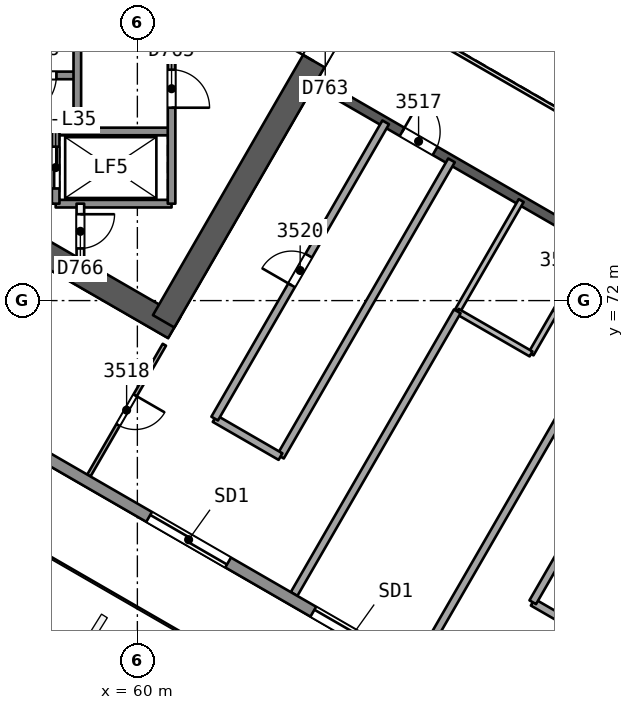
"""IFC4 building model, lengths in metres.
Left out: names, types, materials, properties, quantities, classifications, styles, units other than length and angle.
Written with IfcOpenShell. Run it as: python <this file> out.ifc"""

import sys

from ifc_helpers import new_model, si_unit, direction, frame, frame_2d, origin, place, context, subcontext, project, spatial, rectangle, extrude, element, fill, save


model = new_model("IFC4")
c1 = context("Model", 3, precision=1e-05, world=origin(), true_north=direction((0.0, 1.0)))
c2 = subcontext(c1, "Body", "Model", "MODEL_VIEW")
j1 = project(units=[si_unit("LENGTHUNIT", "METRE"), si_unit("PLANEANGLEUNIT", "RADIAN")], contexts=[c1])
p1 = place(None, origin())
s1 = spatial("IfcSite", under=j1, at=p1, CompositionType="ELEMENT")
p2 = place(p1, origin())
s2 = spatial("IfcBuilding", under=s1, at=p2, CompositionType="ELEMENT")
p3 = place(p2, frame((0.0, 0.0, 143.8)))
s3 = spatial("IfcBuildingStorey", under=s2, at=p3, CompositionType="ELEMENT", Elevation=143.8)
p4 = place(p3, frame((48.722, 78.365, 0.0), z_axis=(0.0, 0.0, 1.0), x_axis=(0.866020036431, -0.500009296414, 0.0)))
e1 = element("IfcWall", 1, at=p4, inside=s3, PredefinedType="SHEAR", context=c2, shape_type="SweptSolid", body=[
    extrude(rectangle(XDim=14.146, YDim=0.65, at=frame_2d((7.073, 0.0))), origin(), (0.0, 0.0, 1.0), 3.7),
])
p5 = place(p3, frame((60.691, 71.455, 0.0), z_axis=(0.0, 0.0, 1.0), x_axis=(0.499983075189, 0.866035175108, 0.0)))
e2 = element("IfcWall", 2, at=p5, inside=s3, PredefinedType="SHEAR", context=c2, shape_type="SweptSolid", body=[
    extrude(rectangle(XDim=10.055, YDim=0.65, at=frame_2d((5.027, 0.0))), origin(), (0.0, 0.0, 1.0), 3.7),
])
p6 = place(p5, frame((7.905, 0.0, 0.0)))
e3 = element("IfcOpeningElement", 3, at=p6, cuts=e2, PredefinedType="OPENING", context=c2, shape_type="SweptSolid", body=[
    extrude(rectangle(XDim=1.2, YDim=2.1, at=frame_2d((0.6, 1.05))), frame((0.0, 0.335, 0.0), z_axis=(0.0, -1.0, 0.0), x_axis=(1.0, 0.0, 0.0)), (0.0, 0.0, 1.0), 0.671),
])
p7 = place(p3, frame((64.7, 77.748, 0.0), z_axis=(0.0, 0.0, 1.0), x_axis=(0.866026492143, -0.499998114903, 0.0)))
e4 = element("IfcWall", 4, at=p7, inside=s3, PredefinedType="SHEAR", context=c2, shape_type="SweptSolid", body=[
    extrude(rectangle(XDim=15.588, YDim=0.25, at=frame_2d((7.794, 0.0))), origin(), (0.0, 0.0, 1.0), 3.25),
])
p8 = place(p7, frame((2.618, 0.0, 0.0)))
e5 = element("IfcOpeningElement", 5, at=p8, cuts=e4, PredefinedType="OPENING", context=c2, shape_type="SweptSolid", body=[
    extrude(rectangle(XDim=1.0, YDim=2.1, at=frame_2d((0.5, 1.05))), frame((0.0, 0.135, 0.0), z_axis=(0.0, -1.0, 0.0), x_axis=(1.0, 0.0, 0.0)), (0.0, 0.0, 1.0), 0.271),
])
p9 = place(p7, frame((8.727, 0.0, 0.0)))
e6 = element("IfcOpeningElement", 6, at=p9, cuts=e4, PredefinedType="OPENING", context=c2, shape_type="SweptSolid", body=[
    extrude(rectangle(XDim=1.0, YDim=2.1, at=frame_2d((0.5, 1.05))), frame((0.0, 0.135, 0.0), z_axis=(0.0, -1.0, 0.0), x_axis=(1.0, 0.0, 0.0)), (0.0, 0.0, 1.0), 0.271),
])
p10 = place(p7, frame((12.282, 0.0, 0.0)))
e7 = element("IfcOpeningElement", 7, at=p10, cuts=e4, PredefinedType="OPENING", context=c2, shape_type="SweptSolid", body=[
    extrude(rectangle(XDim=1.0, YDim=2.1, at=frame_2d((0.5, 1.05))), frame((0.0, 0.135, 0.0), z_axis=(0.0, -1.0, 0.0), x_axis=(1.0, 0.0, 0.0)), (0.0, 0.0, 1.0), 0.271),
])
p11 = place(p3, frame((60.71, 70.838, 0.0), z_axis=(0.0, 0.0, 1.0), x_axis=(-0.499997169302, -0.866027038082, 0.0)))
e8 = element("IfcWall", 8, at=p11, inside=s3, PredefinedType="PARTITIONING", context=c2, shape_type="SweptSolid", body=[
    extrude(rectangle(XDim=3.975, YDim=0.1, at=frame_2d((1.987, 0.0))), origin(), (0.0, 0.0, 1.0), 3.25),
])
p12 = place(p11, frame((1.537, 0.0, 0.0)))
e9 = element("IfcOpeningElement", 9, at=p12, cuts=e8, PredefinedType="OPENING", context=c2, shape_type="SweptSolid", body=[
    extrude(rectangle(XDim=0.9, YDim=2.1, at=frame_2d((0.45, 1.05))), frame((0.0, 0.061, 0.0), z_axis=(0.0, -1.0, 0.0), x_axis=(1.0, 0.0, 0.0)), (0.0, 0.0, 1.0), 0.121),
])
p13 = place(p3, frame((68.266, 75.689, 0.0), z_axis=(0.0, 0.0, 1.0), x_axis=(-0.5000018851, -0.866024315419, 0.0)))
e10 = element("IfcWall", 10, at=p13, inside=s3, PredefinedType="PARTITIONING", context=c2, shape_type="SweptSolid", body=[
    extrude(rectangle(XDim=9.0, YDim=0.2, at=frame_2d((4.5, 0.0))), origin(), (0.0, 0.0, 1.0), 3.25),
])
p14 = place(p3, frame((63.766, 67.895, 0.0), z_axis=(0.0, 0.0, 1.0), x_axis=(-0.866041268327, 0.499972520799, 0.0)))
e11 = element("IfcWall", 11, at=p14, inside=s3, PredefinedType="PARTITIONING", context=c2, shape_type="SweptSolid", body=[
    extrude(rectangle(XDim=2.0, YDim=0.2, at=frame_2d((1.0, 0.0))), origin(), (0.0, 0.0, 1.0), 3.25),
])
p15 = place(p3, frame((62.034, 68.895, 0.0), z_axis=(0.0, 0.0, 1.0), x_axis=(0.5000018851, 0.866024315419, 0.0)))
e12 = element("IfcWall", 12, at=p15, inside=s3, PredefinedType="PARTITIONING", context=c2, shape_type="SweptSolid", body=[
    extrude(rectangle(XDim=9.0, YDim=0.2, at=frame_2d((4.5, 0.0))), origin(), (0.0, 0.0, 1.0), 3.25),
])
p16 = place(p15, frame((4.05, 0.0, 0.0)))
e13 = element("IfcOpeningElement", 13, at=p16, cuts=e12, PredefinedType="OPENING", context=c2, shape_type="SweptSolid", body=[
    extrude(rectangle(XDim=0.9, YDim=2.1, at=frame_2d((0.45, 1.05))), frame((0.0, 0.11, 0.0), z_axis=(0.0, -1.0, 0.0), x_axis=(1.0, 0.0, 0.0)), (0.0, 0.0, 1.0), 0.221),
])
p17 = place(p3, frame((64.123, 64.279, 0.0), z_axis=(0.0, 0.0, 1.0), x_axis=(0.500006224803, 0.866021809863, 0.0)))
e14 = element("IfcWall", 14, at=p17, inside=s3, PredefinedType="PARTITIONING", context=c2, shape_type="SweptSolid", body=[
    extrude(rectangle(XDim=8.589, YDim=0.2, at=frame_2d((4.295, 0.0))), origin(), (0.0, 0.0, 1.0), 3.25),
])
p18 = place(p3, frame((68.418, 71.717, 0.0), z_axis=(0.0, 0.0, 1.0), x_axis=(0.499994660107, 0.866028486751, 0.0)))
e15 = element("IfcWall", 15, at=p18, inside=s3, PredefinedType="PARTITIONING", context=c2, shape_type="SweptSolid", body=[
    extrude(rectangle(XDim=3.364, YDim=0.15, at=frame_2d((1.682, 0.0))), origin(), (0.0, 0.0, 1.0), 3.25),
])
p19 = place(p3, frame((72.041, 73.51, 0.0), z_axis=(0.0, 0.0, 1.0), x_axis=(-0.499994660107, -0.866028486751, 0.0)))
e16 = element("IfcWall", 16, at=p19, inside=s3, PredefinedType="PARTITIONING", context=c2, shape_type="SweptSolid", body=[
    extrude(rectangle(XDim=3.364, YDim=0.15, at=frame_2d((1.682, 0.0))), origin(), (0.0, 0.0, 1.0), 3.25),
])
p20 = place(p19, frame((1.282, 0.0, 0.0)))
e17 = element("IfcOpeningElement", 17, at=p20, cuts=e16, PredefinedType="OPENING", context=c2, shape_type="SweptSolid", body=[
    extrude(rectangle(XDim=0.8, YDim=2.1, at=frame_2d((0.4, 1.05))), frame((0.0, 0.085, 0.0), z_axis=(0.0, -1.0, 0.0), x_axis=(1.0, 0.0, 0.0)), (0.0, 0.0, 1.0), 0.171),
])
p21 = place(p3, frame((70.359, 70.596, 0.0), z_axis=(0.0, 0.0, 1.0), x_axis=(-0.866022320763, 0.500005339912, 0.0)))
e18 = element("IfcWall", 18, at=p21, inside=s3, PredefinedType="PARTITIONING", context=c2, shape_type="SweptSolid", body=[
    extrude(rectangle(XDim=2.241, YDim=0.15, at=frame_2d((1.121, 0.0))), origin(), (0.0, 0.0, 1.0), 3.25),
])
p22 = place(p3, frame((67.363, 62.408, 0.0), z_axis=(0.0, 0.0, 1.0), x_axis=(0.500002969958, 0.866023689072, 0.0)))
e19 = element("IfcWall", 19, at=p22, inside=s3, PredefinedType="PARTITIONING", context=c2, shape_type="SweptSolid", body=[
    extrude(rectangle(XDim=11.954, YDim=0.2, at=frame_2d((5.977, 0.0))), origin(), (0.0, 0.0, 1.0), 3.25),
])
p23 = place(p3, frame((72.136, 63.063, 0.0), z_axis=(0.0, 0.0, 1.0), x_axis=(-0.866010750942, 0.50002537861, 0.0)))
e20 = element("IfcWall", 20, at=p23, inside=s3, PredefinedType="PARTITIONING", context=c2, shape_type="SweptSolid", body=[
    extrude(rectangle(XDim=2.0, YDim=0.2, at=frame_2d((1.0, 0.0))), origin(), (0.0, 0.0, 1.0), 3.25),
])
p24 = place(p3, frame((70.404, 64.063, 0.0), z_axis=(0.0, 0.0, 1.0), x_axis=(0.499990139034, 0.866031096941, 0.0)))
e21 = element("IfcWall", 21, at=p24, inside=s3, PredefinedType="PARTITIONING", context=c2, shape_type="SweptSolid", body=[
    extrude(rectangle(XDim=9.0, YDim=0.2, at=frame_2d((4.5, 0.0))), origin(), (0.0, 0.0, 1.0), 3.25),
])
p25 = place(p24, frame((4.05, 0.0, 0.0)))
e22 = element("IfcOpeningElement", 22, at=p25, cuts=e21, PredefinedType="OPENING", context=c2, shape_type="SweptSolid", body=[
    extrude(rectangle(XDim=0.9, YDim=2.1, at=frame_2d((0.45, 1.05))), frame((0.0, 0.11, 0.0), z_axis=(0.0, -1.0, 0.0), x_axis=(1.0, 0.0, 0.0)), (0.0, 0.0, 1.0), 0.221),
])
p26 = place(p3, frame((89.31, 49.565, 0.0), z_axis=(0.0, 0.0, 1.0), x_axis=(-0.866024712045, 0.500001198125, 0.0)))
e23 = element("IfcWall", 23, at=p26, inside=s3, PredefinedType="SOLIDWALL", context=c2, shape_type="SweptSolid", body=[
    extrude(rectangle(XDim=55.219, YDim=0.3, at=frame_2d((27.61, 0.0))), origin(), (0.0, 0.0, 1.0), 3.25),
])
p27 = place(p26, frame((31.086, 0.0, 0.0)))
e24 = element("IfcOpeningElement", 24, at=p27, cuts=e23, PredefinedType="OPENING", context=c2, shape_type="SweptSolid", body=[
    extrude(rectangle(XDim=2.4, YDim=2.4, at=frame_2d((1.2, 1.2))), frame((0.0, 0.161, 0.0), z_axis=(0.0, -1.0, 0.0), x_axis=(1.0, 0.0, 0.0)), (0.0, 0.0, 1.0), 0.321),
])
p28 = place(p26, frame((42.892, 0.0, 0.0)))
e25 = element("IfcOpeningElement", 25, at=p28, cuts=e23, PredefinedType="OPENING", context=c2, shape_type="SweptSolid", body=[
    extrude(rectangle(XDim=2.4, YDim=2.4, at=frame_2d((1.2, 1.2))), frame((0.0, 0.161, 0.0), z_axis=(0.0, -1.0, 0.0), x_axis=(1.0, 0.0, 0.0)), (0.0, 0.0, 1.0), 0.321),
])
p29 = place(p26, frame((21.421, 0.0, 0.0)))
e26 = element("IfcOpeningElement", 26, at=p29, cuts=e23, PredefinedType="OPENING", context=c2, shape_type="SweptSolid", body=[
    extrude(rectangle(XDim=2.4, YDim=2.4, at=frame_2d((1.2, 1.2))), frame((0.0, 0.161, 0.0), z_axis=(0.0, -1.0, 0.0), x_axis=(1.0, 0.0, 0.0)), (0.0, 0.0, 1.0), 0.321),
])
p30 = place(p26, frame((9.906, 0.0, 0.0)))
e27 = element("IfcOpeningElement", 27, at=p30, cuts=e23, PredefinedType="OPENING", context=c2, shape_type="SweptSolid", body=[
    extrude(rectangle(XDim=2.4, YDim=2.4, at=frame_2d((1.2, 1.2))), frame((0.0, 0.161, 0.0), z_axis=(0.0, -1.0, 0.0), x_axis=(1.0, 0.0, 0.0)), (0.0, 0.0, 1.0), 0.321),
])
p31 = place(p26, frame((26.098, 0.0, 0.0)))
e28 = element("IfcOpeningElement", 28, at=p31, cuts=e23, PredefinedType="OPENING", context=c2, shape_type="SweptSolid", body=[
    extrude(rectangle(XDim=2.4, YDim=2.4, at=frame_2d((1.2, 1.2))), frame((0.0, 0.161, 0.0), z_axis=(0.0, -1.0, 0.0), x_axis=(1.0, 0.0, 0.0)), (0.0, 0.0, 1.0), 0.321),
])
p32 = place(p3, frame((58.42, 77.925, 0.0), z_axis=(0.0, 0.0, 1.0), x_axis=(-1.0, 0.0, 0.0)))
e29 = element("IfcWall", 29, at=p32, inside=s3, PredefinedType="SOLIDWALL", context=c2, shape_type="SweptSolid", body=[
    extrude(rectangle(XDim=7.7, YDim=0.2, at=frame_2d((3.85, 0.0))), origin(), (0.0, 0.0, 1.0), 3.25),
])
p33 = place(p32, frame((0.55, 0.0, 0.0)))
e30 = element("IfcOpeningElement", 30, at=p33, cuts=e29, PredefinedType="OPENING", context=c2, shape_type="SweptSolid", body=[
    extrude(rectangle(XDim=1.1, YDim=2.1, at=frame_2d((0.55, 1.05))), frame((0.0, 0.11, 0.0), z_axis=(0.0, -1.0, 0.0), x_axis=(1.0, 0.0, 0.0)), (0.0, 0.0, 1.0), 0.221),
])
for number, where, z_axis, x_axis in (
    (31, (60.9, 76.45, 0.0), (0.0, 0.0, 1.0), (-1.0, 0.0, 0.0)),
    (32, (60.9, 74.55, 0.0), (0.0, 0.0, 1.0), (-1.0, 0.0, 0.0)),
):
    element("IfcWall", number, at=place(p3, frame(where, z_axis=z_axis, x_axis=x_axis)), inside=s3, PredefinedType="SOLIDWALL", context=c2, shape_type="SweptSolid", body=[
        extrude(rectangle(XDim=3.05, YDim=0.2, at=frame_2d((1.525, 0.0))), origin(), (0.0, 0.0, 1.0), 3.25),
    ])
p34 = place(p3, frame((60.9, 85.45, 0.0), z_axis=(0.0, 0.0, 1.0), x_axis=(0.0, -1.0, 0.0)))
e33 = element("IfcWall", 33, at=p34, inside=s3, PredefinedType="SOLIDWALL", context=c2, shape_type="SweptSolid", body=[
    extrude(rectangle(XDim=10.9, YDim=0.2, at=frame_2d((5.45, 0.0))), origin(), (0.0, 0.0, 1.0), 3.25),
])
p35 = place(p34, frame((2.875, 0.0, 0.0)))
e34 = element("IfcOpeningElement", 34, at=p35, cuts=e33, PredefinedType="OPENING", context=c2, shape_type="SweptSolid", body=[
    extrude(rectangle(XDim=1.0, YDim=2.1, at=frame_2d((0.5, 1.05))), frame((0.0, 0.11, 0.0), z_axis=(0.0, -1.0, 0.0), x_axis=(1.0, 0.0, 0.0)), (0.0, 0.0, 1.0), 0.221),
])
p36 = place(p34, frame((7.375, 0.0, 0.0)))
e35 = element("IfcOpeningElement", 35, at=p36, cuts=e33, PredefinedType="OPENING", context=c2, shape_type="SweptSolid", body=[
    extrude(rectangle(XDim=1.0, YDim=2.1, at=frame_2d((0.5, 1.05))), frame((0.0, 0.11, 0.0), z_axis=(0.0, -1.0, 0.0), x_axis=(1.0, 0.0, 0.0)), (0.0, 0.0, 1.0), 0.221),
])
p37 = place(p3, frame((58.5, 74.55, 0.0), z_axis=(0.0, 0.0, 1.0), x_axis=(0.0, -1.0, 0.0)))
e36 = element("IfcWall", 36, at=p37, inside=s3, PredefinedType="PARTITIONING", context=c2, shape_type="SweptSolid", body=[
    extrude(rectangle(XDim=1.455, YDim=0.2, at=frame_2d((0.728, 0.0))), origin(), (0.0, 0.0, 1.0), 3.25),
])
p38 = place(p37, frame((0.278, 0.0, 0.0)))
e37 = element("IfcOpeningElement", 37, at=p38, cuts=e36, PredefinedType="OPENING", context=c2, shape_type="SweptSolid", body=[
    extrude(rectangle(XDim=0.9, YDim=2.1, at=frame_2d((0.45, 1.05))), frame((0.0, 0.11, 0.0), z_axis=(0.0, -1.0, 0.0), x_axis=(1.0, 0.0, 0.0)), (0.0, 0.0, 1.0), 0.221),
])
p39 = place(p3, frame((58.42, 85.45, 0.0), z_axis=(0.0, 0.0, 1.0), x_axis=(0.0, -1.0, 0.0)))
e38 = element("IfcWall", 38, at=p39, inside=s3, PredefinedType="SOLIDWALL", context=c2, shape_type="SweptSolid", body=[
    extrude(rectangle(XDim=9.0, YDim=0.2, at=frame_2d((4.5, 0.0))), origin(), (0.0, 0.0, 1.0), 3.25),
])
p40 = place(p3, frame((57.85, 76.45, 0.0), z_axis=(0.0, 0.0, 1.0), x_axis=(0.0, -1.0, 0.0)))
e39 = element("IfcWall", 39, at=p40, inside=s3, PredefinedType="SOLIDWALL", context=c2, shape_type="SweptSolid", body=[
    extrude(rectangle(XDim=1.9, YDim=0.2, at=frame_2d((0.95, 0.0))), origin(), (0.0, 0.0, 1.0), 3.25),
])
p41 = place(p40, frame((0.4, 0.0, 0.0)))
e40 = element("IfcOpeningElement", 40, at=p41, cuts=e39, PredefinedType="OPENING", context=c2, shape_type="SweptSolid", body=[
    extrude(rectangle(XDim=1.1, YDim=2.1, at=frame_2d((0.55, 1.05))), frame((0.0, 0.11, 0.0), z_axis=(0.0, -1.0, 0.0), x_axis=(1.0, 0.0, 0.0)), (0.0, 0.0, 1.0), 0.221),
])
p42 = place(p3, frame((67.702, 78.948, 0.0), z_axis=(0.0, 0.0, 1.0), x_axis=(0.866026658274, -0.499997827154, 0.0)))
e41 = element("IfcWall", 41, at=p42, inside=s3, PredefinedType="PARTITIONING", context=c2, shape_type="SweptSolid", body=[
    extrude(rectangle(XDim=11.588, YDim=0.1, at=frame_2d((5.794, 0.0))), origin(), (0.0, 0.0, 1.0), 3.25),
])
p43 = place(p8, origin())
e42 = element("IfcDoor", 42, at=p43, inside=s3, OperationType="SINGLE_SWING_LEFT", PredefinedType="NOTDEFINED", context=c2, shape_type="SweptSolid", body=[
    extrude(rectangle(XDim=1.0, YDim=2.1, at=frame_2d((0.5, 1.05))), frame((0.0, 0.025, 0.0), z_axis=(0.0, -1.0, 0.0), x_axis=(1.0, 0.0, 0.0)), (0.0, 0.0, 1.0), 0.05),
])
fill(e5, e42)
p44 = place(p12, origin())
e43 = element("IfcDoor", 43, at=p44, inside=s3, OperationType="SINGLE_SWING_LEFT", PredefinedType="NOTDEFINED", context=c2, shape_type="SweptSolid", body=[
    extrude(rectangle(XDim=0.9, YDim=2.1, at=frame_2d((0.45, 1.05))), frame((0.0, 0.025, 0.0), z_axis=(0.0, -1.0, 0.0), x_axis=(1.0, 0.0, 0.0)), (0.0, 0.0, 1.0), 0.05),
])
fill(e9, e43)
p45 = place(p16, origin())
e44 = element("IfcDoor", 44, at=p45, inside=s3, OperationType="SINGLE_SWING_LEFT", PredefinedType="NOTDEFINED", context=c2, shape_type="SweptSolid", body=[
    extrude(rectangle(XDim=0.9, YDim=2.1, at=frame_2d((0.45, 1.05))), frame((0.0, 0.025, 0.0), z_axis=(0.0, -1.0, 0.0), x_axis=(1.0, 0.0, 0.0)), (0.0, 0.0, 1.0), 0.05),
])
fill(e13, e44)
p46 = place(p27, origin())
e45 = element("IfcDoor", 45, at=p46, inside=s3, OperationType="SLIDING_TO_LEFT", PredefinedType="NOTDEFINED", context=c2, shape_type="SweptSolid", body=[
    extrude(rectangle(XDim=2.4, YDim=2.4, at=frame_2d((1.2, 1.2))), frame((0.0, 0.025, 0.0), z_axis=(0.0, -1.0, 0.0), x_axis=(1.0, 0.0, 0.0)), (0.0, 0.0, 1.0), 0.05),
])
fill(e24, e45)
p47 = place(p31, origin())
e46 = element("IfcDoor", 46, at=p47, inside=s3, OperationType="SLIDING_TO_LEFT", PredefinedType="NOTDEFINED", context=c2, shape_type="SweptSolid", body=[
    extrude(rectangle(XDim=2.4, YDim=2.4, at=frame_2d((1.2, 1.2))), frame((0.0, 0.025, 0.0), z_axis=(0.0, -1.0, 0.0), x_axis=(1.0, 0.0, 0.0)), (0.0, 0.0, 1.0), 0.05),
])
fill(e28, e46)
p48 = place(p6, origin())
e47 = element("IfcDoor", 47, at=p48, inside=s3, OperationType="SINGLE_SWING_LEFT", PredefinedType="NOTDEFINED", context=c2, shape_type="SweptSolid", body=[
    extrude(rectangle(XDim=1.2, YDim=2.1, at=frame_2d((0.6, 1.05))), frame((0.0, 0.025, 0.0), z_axis=(0.0, -1.0, 0.0), x_axis=(1.0, 0.0, 0.0)), (0.0, 0.0, 1.0), 0.05),
])
fill(e3, e47)
p49 = place(p41, origin())
e48 = element("IfcDoor", 48, at=p49, inside=s3, OperationType="SLIDING_TO_RIGHT", PredefinedType="NOTDEFINED", context=c2, shape_type="SweptSolid", body=[
    extrude(rectangle(XDim=1.1, YDim=2.1, at=frame_2d((0.55, 1.05))), frame((0.0, 0.025, 0.0), z_axis=(0.0, -1.0, 0.0), x_axis=(1.0, 0.0, 0.0)), (0.0, 0.0, 1.0), 0.05),
])
fill(e40, e48)
p50 = place(p36, origin())
e49 = element("IfcDoor", 49, at=p50, inside=s3, OperationType="SINGLE_SWING_RIGHT", PredefinedType="NOTDEFINED", context=c2, shape_type="SweptSolid", body=[
    extrude(rectangle(XDim=1.0, YDim=2.1, at=frame_2d((0.5, 1.05))), frame((0.0, 0.025, 0.0), z_axis=(0.0, -1.0, 0.0), x_axis=(1.0, 0.0, 0.0)), (0.0, 0.0, 1.0), 0.05),
])
fill(e35, e49)
p51 = place(p38, origin())
e50 = element("IfcDoor", 50, at=p51, inside=s3, OperationType="SINGLE_SWING_LEFT", PredefinedType="NOTDEFINED", context=c2, shape_type="SweptSolid", body=[
    extrude(rectangle(XDim=0.9, YDim=2.1, at=frame_2d((0.45, 1.05))), frame((0.0, 0.025, 0.0), z_axis=(0.0, -1.0, 0.0), x_axis=(1.0, 0.0, 0.0)), (0.0, 0.0, 1.0), 0.05),
])
fill(e37, e50)
p52 = place(p33, origin())
e51 = element("IfcDoor", 51, at=p52, inside=s3, OperationType="SINGLE_SWING_RIGHT", PredefinedType="NOTDEFINED", context=c2, shape_type="SweptSolid", body=[
    extrude(rectangle(XDim=1.1, YDim=2.1, at=frame_2d((0.55, 1.05))), frame((0.0, 0.025, 0.0), z_axis=(0.0, -1.0, 0.0), x_axis=(1.0, 0.0, 0.0)), (0.0, 0.0, 1.0), 0.05),
])
fill(e30, e51)
save(model, sys.argv[1])
